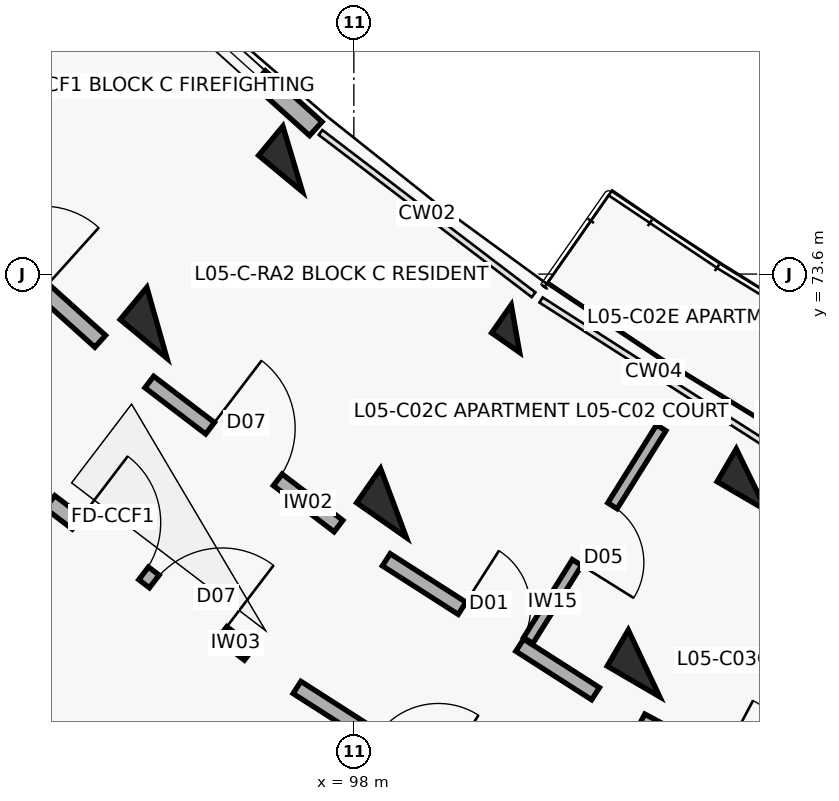
"""IFC4 building model, lengths in metres.
Left out: names, types, materials, properties, quantities, classifications, styles, units other than length and angle.
Written with IfcOpenShell. Run it as: python <this file> out.ifc"""

import sys

from ifc_helpers import new_model, si_unit, direction, frame, frame_2d, origin, origin_2d, place, context, subcontext, project, spatial, rectangle, extrude, element, fill, save


model = new_model("IFC4")
c1 = context("Model", 3, precision=1e-05, world=origin(), true_north=direction((0.0, 1.0)))
c2 = subcontext(c1, "Body", "Model", "MODEL_VIEW")
j1 = project(units=[si_unit("LENGTHUNIT", "METRE"), si_unit("PLANEANGLEUNIT", "RADIAN")], contexts=[c1])
p1 = place(None, origin())
s1 = spatial("IfcSite", under=j1, at=p1, CompositionType="ELEMENT")
p2 = place(p1, origin())
s2 = spatial("IfcBuilding", under=s1, at=p2, CompositionType="ELEMENT")
p3 = place(p2, frame((0.0, 0.0, 17.4)))
s3 = spatial("IfcBuildingStorey", under=s2, at=p3, CompositionType="ELEMENT", Elevation=17.4)
p4 = place(p3, frame((97.195, 75.115, 0.0), z_axis=(0.0, 0.0, 1.0), x_axis=(-0.637961754089, -0.770068049148, 0.0)))
e1 = element("IfcColumn", 1, at=p4, inside=s3, PredefinedType="COLUMN", context=c2, shape_type="SweptSolid", body=[
    extrude(rectangle(XDim=0.5, YDim=0.75, at=origin_2d()), origin(), (0.0, 0.0, 1.0), 3.1),
])
p5 = place(p3, frame((95.409, 72.958, 0.0), z_axis=(0.0, 0.0, 1.0), x_axis=(-0.637961754089, -0.770068049148, 0.0)))
e2 = element("IfcColumn", 2, at=p5, inside=s3, PredefinedType="COLUMN", context=c2, shape_type="SweptSolid", body=[
    extrude(rectangle(XDim=0.55, YDim=0.8, at=origin_2d()), origin(), (0.0, 0.0, 1.0), 3.1),
])
p6 = place(p3, frame((100.126, 72.882, 0.0), z_axis=(0.0, 0.0, 1.0), x_axis=(-0.573004420611, -0.819552276527, 0.0)))
e3 = element("IfcColumn", 3, at=p6, inside=s3, PredefinedType="COLUMN", context=c2, shape_type="SweptSolid", body=[
    extrude(rectangle(XDim=0.45, YDim=0.45, at=origin_2d()), origin(), (0.0, 0.0, 1.0), 3.1),
])
p7 = place(p3, frame((98.522, 70.587, 0.0), z_axis=(0.0, 0.0, 1.0), x_axis=(-0.573004420611, -0.819552276527, 0.0)))
e4 = element("IfcColumn", 4, at=p7, inside=s3, PredefinedType="COLUMN", context=c2, shape_type="SweptSolid", body=[
    extrude(rectangle(XDim=0.55, YDim=0.8, at=origin_2d()), origin(), (0.0, 0.0, 1.0), 3.1),
])
p8 = place(p3, frame((103.229, 70.896, 0.0), z_axis=(0.0, 0.0, 1.0), x_axis=(-0.504226211181, -0.863571611366, 0.0)))
e5 = element("IfcColumn", 5, at=p8, inside=s3, PredefinedType="COLUMN", context=c2, shape_type="SweptSolid", body=[
    extrude(rectangle(XDim=0.5, YDim=0.75, at=origin_2d()), origin(), (0.0, 0.0, 1.0), 3.1),
])
p9 = place(p3, frame((101.817, 68.478, 0.0), z_axis=(0.0, 0.0, 1.0), x_axis=(-0.504226211181, -0.863571611366, 0.0)))
e6 = element("IfcColumn", 6, at=p9, inside=s3, PredefinedType="COLUMN", context=c2, shape_type="SweptSolid", body=[
    extrude(rectangle(XDim=0.55, YDim=0.8, at=origin_2d()), origin(), (0.0, 0.0, 1.0), 3.1),
])
p10 = place(p3, frame((94.82, 77.923, 0.0), z_axis=(0.0, 0.0, 1.0), x_axis=(0.743385092197, -0.668863666751, 0.0)))
e7 = element("IfcWall", 7, at=p10, inside=s3, PredefinedType="SOLIDWALL", context=c2, shape_type="SweptSolid", body=[
    extrude(rectangle(XDim=3.604, YDim=0.245, at=frame_2d((1.802, 0.0))), origin(), (0.0, 0.0, 1.0), 2.25),
])
p11 = place(p10, frame((1.002, 0.0, 0.32)))
e8 = element("IfcOpeningElement", 8, at=p11, cuts=e7, PredefinedType="OPENING", context=c2, shape_type="SweptSolid", body=[
    extrude(rectangle(XDim=1.6, YDim=1.5, at=frame_2d((0.8, 0.75))), frame((0.0, 0.133, 0.0), z_axis=(0.0, -1.0, 0.0), x_axis=(1.0, 0.0, 0.0)), (0.0, 0.0, 1.0), 0.265),
])
p12 = place(p3, frame((92.337, 74.808, 0.0), z_axis=(0.0, 0.0, 1.0), x_axis=(0.743348465558, -0.668904371904, 0.0)))
e9 = element("IfcWall", 9, at=p12, inside=s3, PredefinedType="SOLIDWALL", context=c2, shape_type="SweptSolid", body=[
    extrude(rectangle(XDim=3.129, YDim=0.21, at=frame_2d((1.564, 0.0))), origin(), (0.0, 0.0, 1.0), 2.08),
])
p13 = place(p12, frame((1.014, 0.0, 0.0)))
e10 = element("IfcOpeningElement", 10, at=p13, cuts=e9, PredefinedType="OPENING", context=c2, shape_type="SweptSolid", body=[
    extrude(rectangle(XDim=1.1, YDim=2.15, at=frame_2d((0.55, 1.075))), frame((0.0, 0.115, 0.0), z_axis=(0.0, -1.0, 0.0), x_axis=(1.0, 0.0, 0.0)), (0.0, 0.0, 1.0), 0.23),
])
p14 = place(p3, frame((94.001, 70.602, 0.0), z_axis=(0.0, 0.0, 1.0), x_axis=(0.795498026433, -0.605956178235, 0.0)))
e11 = element("IfcWall", 11, at=p14, inside=s3, PredefinedType="SOLIDWALL", context=c2, shape_type="SweptSolid", body=[
    extrude(rectangle(XDim=3.296, YDim=0.21, at=frame_2d((1.648, 0.0))), origin(), (0.0, 0.0, 1.0), 2.08),
])
p15 = place(p14, frame((0.45, 0.0, 0.0)))
e12 = element("IfcOpeningElement", 12, at=p15, cuts=e11, PredefinedType="OPENING", context=c2, shape_type="SweptSolid", body=[
    extrude(rectangle(XDim=1.1, YDim=2.15, at=frame_2d((0.55, 1.075))), frame((0.0, 0.115, 0.0), z_axis=(0.0, -1.0, 0.0), x_axis=(1.0, 0.0, 0.0)), (0.0, 0.0, 1.0), 0.23),
])
p16 = place(p14, frame((1.726, 0.0, 0.0)))
e13 = element("IfcOpeningElement", 13, at=p16, cuts=e11, PredefinedType="OPENING", context=c2, shape_type="SweptSolid", body=[
    extrude(rectangle(XDim=1.12, YDim=2.15, at=frame_2d((0.56, 1.075))), frame((0.0, 0.115, 0.0), z_axis=(0.0, -1.0, 0.0), x_axis=(1.0, 0.0, 0.0)), (0.0, 0.0, 1.0), 0.23),
])
p17 = place(p3, frame((95.309, 72.18, 0.0), z_axis=(0.0, 0.0, 1.0), x_axis=(0.795463961918, -0.606000895453, 0.0)))
e14 = element("IfcWall", 14, at=p17, inside=s3, PredefinedType="SOLIDWALL", context=c2, shape_type="SweptSolid", body=[
    extrude(rectangle(XDim=3.129, YDim=0.19, at=frame_2d((1.564, 0.0))), origin(), (0.0, 0.0, 1.0), 2.08),
])
p18 = place(p17, frame((1.004, 0.0, 0.0)))
e15 = element("IfcOpeningElement", 15, at=p18, cuts=e14, PredefinedType="OPENING", context=c2, shape_type="SweptSolid", body=[
    extrude(rectangle(XDim=1.12, YDim=2.15, at=frame_2d((0.56, 1.075))), frame((0.0, 0.105, 0.0), z_axis=(0.0, -1.0, 0.0), x_axis=(1.0, 0.0, 0.0)), (0.0, 0.0, 1.0), 0.21),
])
p19 = place(p3, frame((97.252, 68.161, 0.0), z_axis=(0.0, 0.0, 1.0), x_axis=(0.842289466461, -0.53902546757, 0.0)))
e16 = element("IfcWall", 16, at=p19, inside=s3, PredefinedType="SOLIDWALL", context=c2, shape_type="SweptSolid", body=[
    extrude(rectangle(XDim=3.436, YDim=0.19, at=frame_2d((1.718, 0.0))), origin(), (0.0, 0.0, 1.0), 2.08),
])
p20 = place(p19, frame((1.228, 0.0, 0.0)))
e17 = element("IfcOpeningElement", 17, at=p20, cuts=e16, PredefinedType="OPENING", context=c2, shape_type="SweptSolid", body=[
    extrude(rectangle(XDim=0.98, YDim=2.15, at=frame_2d((0.49, 1.075))), frame((0.0, 0.105, 0.0), z_axis=(0.0, -1.0, 0.0), x_axis=(1.0, 0.0, 0.0)), (0.0, 0.0, 1.0), 0.21),
])
p21 = place(p3, frame((98.427, 69.841, 0.0), z_axis=(0.0, 0.0, 1.0), x_axis=(0.842280895761, -0.539038860043, 0.0)))
e18 = element("IfcWall", 18, at=p21, inside=s3, PredefinedType="SOLIDWALL", context=c2, shape_type="SweptSolid", body=[
    extrude(rectangle(XDim=3.269, YDim=0.19, at=frame_2d((1.634, 0.0))), origin(), (0.0, 0.0, 1.0), 2.08),
])
p22 = place(p21, frame((1.184, 0.0, 0.0)))
e19 = element("IfcOpeningElement", 19, at=p22, cuts=e18, PredefinedType="OPENING", context=c2, shape_type="SweptSolid", body=[
    extrude(rectangle(XDim=0.9, YDim=2.1, at=frame_2d((0.45, 1.05))), frame((0.0, 0.105, 0.0), z_axis=(0.0, -1.0, 0.0), x_axis=(1.0, 0.0, 0.0)), (0.0, 0.0, 1.0), 0.21),
])
p23 = place(p3, frame((102.044, 71.577, 0.0), z_axis=(0.0, 0.0, 1.0), x_axis=(-0.53015188203, -0.847902696057, 0.0)))
e20 = element("IfcWall", 20, at=p23, inside=s3, PredefinedType="PARTITIONING", context=c2, shape_type="SweptSolid", body=[
    extrude(rectangle(XDim=3.3, YDim=0.145, at=frame_2d((1.65, 0.0))), origin(), (0.0, 0.0, 1.0), 2.08),
])
p24 = place(p23, frame((1.21, 0.0, 0.0)))
e21 = element("IfcOpeningElement", 21, at=p24, cuts=e20, PredefinedType="OPENING", context=c2, shape_type="SweptSolid", body=[
    extrude(rectangle(XDim=0.88, YDim=2.1, at=frame_2d((0.44, 1.05))), frame((0.0, 0.083, 0.0), z_axis=(0.0, -1.0, 0.0), x_axis=(1.0, 0.0, 0.0)), (0.0, 0.0, 1.0), 0.165),
])
p25 = place(p3, frame((101.784, 67.726, 0.0), z_axis=(0.0, 0.0, 1.0), x_axis=(0.883444301944, -0.468536194293, 0.0)))
e22 = element("IfcWall", 22, at=p25, inside=s3, PredefinedType="SOLIDWALL", context=c2, shape_type="SweptSolid", body=[
    extrude(rectangle(XDim=3.269, YDim=0.19, at=frame_2d((1.634, 0.0))), origin(), (0.0, 0.0, 1.0), 2.08),
])
p26 = place(p25, frame((1.174, 0.0, 0.0)))
e23 = element("IfcOpeningElement", 23, at=p26, cuts=e22, PredefinedType="OPENING", context=c2, shape_type="SweptSolid", body=[
    extrude(rectangle(XDim=0.92, YDim=2.1, at=frame_2d((0.46, 1.05))), frame((0.0, 0.105, 0.0), z_axis=(0.0, -1.0, 0.0), x_axis=(1.0, 0.0, 0.0)), (0.0, 0.0, 1.0), 0.21),
])
p27 = place(p11, origin())
e24 = element("IfcWindow", 24, at=p27, inside=s3, PartitioningType="DOUBLE_PANEL_VERTICAL", PredefinedType="WINDOW", context=c2, shape_type="SweptSolid", body=[
    extrude(rectangle(XDim=1.6, YDim=1.5, at=frame_2d((0.8, 0.75))), frame((0.0, 0.03, 0.0), z_axis=(0.0, -1.0, 0.0), x_axis=(1.0, 0.0, 0.0)), (0.0, 0.0, 1.0), 0.06),
])
fill(e8, e24)
p28 = place(p15, origin())
e25 = element("IfcDoor", 25, at=p28, inside=s3, OperationType="SINGLE_SWING_LEFT", PredefinedType="DOOR", context=c2, shape_type="SweptSolid", body=[
    extrude(rectangle(XDim=1.1, YDim=2.15, at=frame_2d((0.55, 1.075))), frame((0.0, 0.025, 0.0), z_axis=(0.0, -1.0, 0.0), x_axis=(1.0, 0.0, 0.0)), (0.0, 0.0, 1.0), 0.05),
])
fill(e12, e25)
p29 = place(p16, origin())
e26 = element("IfcDoor", 26, at=p29, inside=s3, OperationType="SINGLE_SWING_RIGHT", PredefinedType="DOOR", context=c2, shape_type="SweptSolid", body=[
    extrude(rectangle(XDim=1.12, YDim=2.15, at=frame_2d((0.56, 1.075))), frame((0.0, 0.025, 0.0), z_axis=(0.0, -1.0, 0.0), x_axis=(1.0, 0.0, 0.0)), (0.0, 0.0, 1.0), 0.05),
])
fill(e13, e26)
p30 = place(p18, origin())
e27 = element("IfcDoor", 27, at=p30, inside=s3, OperationType="SINGLE_SWING_LEFT", PredefinedType="DOOR", context=c2, shape_type="SweptSolid", body=[
    extrude(rectangle(XDim=1.12, YDim=2.15, at=frame_2d((0.56, 1.075))), frame((0.0, 0.025, 0.0), z_axis=(0.0, -1.0, 0.0), x_axis=(1.0, 0.0, 0.0)), (0.0, 0.0, 1.0), 0.05),
])
fill(e15, e27)
p31 = place(p22, origin())
e28 = element("IfcDoor", 28, at=p31, inside=s3, OperationType="SINGLE_SWING_LEFT", PredefinedType="DOOR", context=c2, shape_type="SweptSolid", body=[
    extrude(rectangle(XDim=0.9, YDim=2.1, at=frame_2d((0.45, 1.05))), frame((0.0, 0.025, 0.0), z_axis=(0.0, -1.0, 0.0), x_axis=(1.0, 0.0, 0.0)), (0.0, 0.0, 1.0), 0.05),
])
fill(e19, e28)
p32 = place(p24, origin())
e29 = element("IfcDoor", 29, at=p32, inside=s3, OperationType="SINGLE_SWING_RIGHT", PredefinedType="DOOR", context=c2, shape_type="SweptSolid", body=[
    extrude(rectangle(XDim=0.88, YDim=2.1, at=frame_2d((0.44, 1.05))), frame((0.0, 0.025, 0.0), z_axis=(0.0, -1.0, 0.0), x_axis=(1.0, 0.0, 0.0)), (0.0, 0.0, 1.0), 0.05),
])
fill(e21, e29)
save(model, sys.argv[1])
